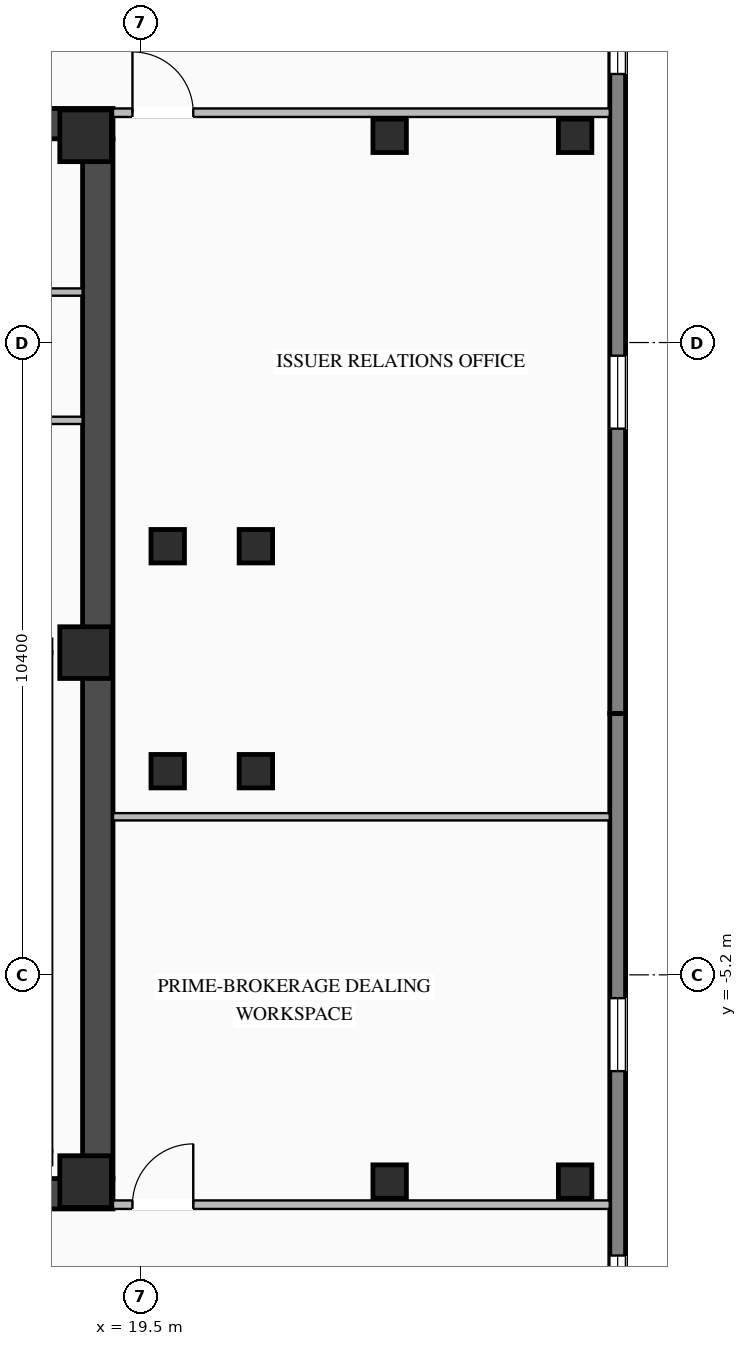
"""IFC4 building model, lengths in metres.
Left out: names, types, materials, properties, quantities, classifications, styles, units other than length and angle.
Written with IfcOpenShell. Run it as: python <this file> out.ifc"""

import sys

from ifc_helpers import new_model, si_unit, direction, frame, frame_2d, origin, origin_2d, place, context, subcontext, project, spatial, rectangle, i_section, extrude, element, fill, save


model = new_model("IFC4")
c1 = context("Model", 3, precision=1e-05, world=origin(), true_north=direction((0.0, 1.0)))
c2 = subcontext(c1, "Body", "Model", "MODEL_VIEW")
j1 = project(units=[si_unit("LENGTHUNIT", "METRE"), si_unit("PLANEANGLEUNIT", "RADIAN")], contexts=[c1])
p1 = place(None, origin())
s1 = spatial("IfcSite", under=j1, at=p1, CompositionType="ELEMENT")
p2 = place(p1, origin())
s2 = spatial("IfcBuilding", under=s1, at=p2, CompositionType="ELEMENT")
p3 = place(p2, frame((0.0, 0.0, 236.1)))
s3 = spatial("IfcBuildingStorey", under=s2, at=p3, CompositionType="ELEMENT", Elevation=236.1)
p4 = place(p3, frame((8.8, -8.8, 0.0), z_axis=(0.0, 0.0, 1.0), x_axis=(1.0, 0.0, 0.0)))
e1 = element("IfcWall", 1, at=p4, inside=s3, PredefinedType="SHEAR", context=c2, shape_type="SweptSolid", body=[
    extrude(rectangle(XDim=10.25, YDim=0.5, at=frame_2d((5.125, 0.0))), origin(), (0.0, 0.0, 1.0), 3.27),
])
p5 = place(p3, frame((8.8, 8.8, 0.0), z_axis=(0.0, 0.0, 1.0), x_axis=(1.0, 0.0, 0.0)))
e2 = element("IfcWall", 2, at=p5, inside=s3, PredefinedType="SHEAR", context=c2, shape_type="SweptSolid", body=[
    extrude(rectangle(XDim=10.25, YDim=0.5, at=frame_2d((5.125, 0.0))), origin(), (0.0, 0.0, 1.0), 3.27),
])
p6 = place(p5, frame((3.25, 0.0, 0.0)))
e3 = element("IfcOpeningElement", 3, at=p6, cuts=e2, PredefinedType="OPENING", context=c2, shape_type="SweptSolid", body=[
    extrude(rectangle(XDim=1.4, YDim=2.05, at=frame_2d((0.7, 1.025))), frame((0.0, 0.26, 0.0), z_axis=(0.0, -1.0, 0.0), x_axis=(1.0, 0.0, 0.0)), (0.0, 0.0, 1.0), 0.52),
])
p7 = place(p3, frame((18.8, -8.55, 0.0), z_axis=(0.0, 0.0, 1.0), x_axis=(0.0, 1.0, 0.0)))
e4 = element("IfcWall", 4, at=p7, inside=s3, PredefinedType="SHEAR", context=c2, shape_type="SweptSolid", body=[
    extrude(rectangle(XDim=17.1, YDim=0.5, at=frame_2d((8.55, 0.0))), origin(), (0.0, 0.0, 1.0), 3.27),
])
for number, where, z_axis, x_axis in (
    (5, (18.6, -8.6, 0.0), (0.0, 0.0, 1.0), (1.0, 0.0, 0.0)),
    (6, (18.6, 0.1, 0.0), (0.0, 0.0, 1.0), (1.0, 0.0, 0.0)),
    (7, (18.6, 8.6, 0.0), (0.0, 0.0, 1.0), (1.0, 0.0, 0.0)),
):
    element("IfcColumn", number, at=place(p3, frame(where, z_axis=z_axis, x_axis=x_axis)), inside=s3, PredefinedType="COLUMN", context=c2, shape_type="SweptSolid", body=[
        extrude(rectangle(XDim=0.85, YDim=0.85, at=origin_2d()), origin(), (0.0, 0.0, 1.0), 3.45),
    ])
for number, where, z_axis, x_axis in (
    (8, (19.95, -1.85, 0.0), (0.0, 0.0, 1.0), (1.0, 0.0, 0.0)),
    (9, (19.95, 1.85, 0.0), (0.0, 0.0, 1.0), (1.0, 0.0, 0.0)),
    (10, (21.4, -1.85, 0.0), (0.0, 0.0, 1.0), (1.0, 0.0, 0.0)),
    (11, (21.4, 1.85, 0.0), (0.0, 0.0, 1.0), (1.0, 0.0, 0.0)),
    (12, (23.6, -8.6, 0.0), (0.0, 0.0, 1.0), (1.0, 0.0, 0.0)),
    (13, (23.6, 8.6, 0.0), (0.0, 0.0, 1.0), (1.0, 0.0, 0.0)),
    (14, (26.65, -8.6, 0.0), (0.0, 0.0, 1.0), (1.0, 0.0, 0.0)),
    (15, (26.65, 8.6, 0.0), (0.0, 0.0, 1.0), (1.0, 0.0, 0.0)),
):
    element("IfcColumn", number, at=place(p3, frame(where, z_axis=z_axis, x_axis=x_axis)), inside=s3, PredefinedType="COLUMN", context=c2, shape_type="SweptSolid", body=[
        extrude(i_section(OverallWidth=0.55, OverallDepth=0.55, WebThickness=0.024, FlangeThickness=0.036, at=origin_2d()), origin(), (0.0, 0.0, 1.0), 3.45),
    ])
p8 = place(p3, frame((27.35, -0.9, 0.0), z_axis=(0.0, 0.0, 1.0), x_axis=(0.0, -1.0, 0.0)))
e16 = element("IfcWall", 16, at=p8, inside=s3, PredefinedType="STANDARD", context=c2, shape_type="SweptSolid", body=[
    extrude(rectangle(XDim=15.85, YDim=0.26, at=frame_2d((7.925, 0.0))), origin(), (0.0, 0.0, 1.0), 3.25),
])
p9 = place(p8, frame((4.683, 0.0, 0.76)))
e17 = element("IfcOpeningElement", 17, at=p9, cuts=e16, PredefinedType="OPENING", context=c2, shape_type="SweptSolid", body=[
    extrude(rectangle(XDim=1.2, YDim=1.95, at=frame_2d((0.6, 0.975))), frame((0.0, 0.14, 0.0), z_axis=(0.0, -1.0, 0.0), x_axis=(1.0, 0.0, 0.0)), (0.0, 0.0, 1.0), 0.28),
])
p10 = place(p8, frame((8.917, 0.0, 0.76)))
e18 = element("IfcOpeningElement", 18, at=p10, cuts=e16, PredefinedType="OPENING", context=c2, shape_type="SweptSolid", body=[
    extrude(rectangle(XDim=1.2, YDim=1.95, at=frame_2d((0.6, 0.975))), frame((0.0, 0.14, 0.0), z_axis=(0.0, -1.0, 0.0), x_axis=(1.0, 0.0, 0.0)), (0.0, 0.0, 1.0), 0.28),
])
p11 = place(p3, frame((27.35, 14.95, 0.0), z_axis=(0.0, 0.0, 1.0), x_axis=(0.0, -1.0, 0.0)))
e19 = element("IfcWall", 19, at=p11, inside=s3, PredefinedType="STANDARD", context=c2, shape_type="SweptSolid", body=[
    extrude(rectangle(XDim=15.85, YDim=0.26, at=frame_2d((7.925, 0.0))), origin(), (0.0, 0.0, 1.0), 3.25),
])
p12 = place(p11, frame((4.133, 0.0, 0.76)))
e20 = element("IfcOpeningElement", 20, at=p12, cuts=e19, PredefinedType="OPENING", context=c2, shape_type="SweptSolid", body=[
    extrude(rectangle(XDim=1.2, YDim=1.95, at=frame_2d((0.6, 0.975))), frame((0.0, 0.14, 0.0), z_axis=(0.0, -1.0, 0.0), x_axis=(1.0, 0.0, 0.0)), (0.0, 0.0, 1.0), 0.28),
])
p13 = place(p11, frame((9.967, 0.0, 0.76)))
e21 = element("IfcOpeningElement", 21, at=p13, cuts=e19, PredefinedType="OPENING", context=c2, shape_type="SweptSolid", body=[
    extrude(rectangle(XDim=1.2, YDim=1.95, at=frame_2d((0.6, 0.975))), frame((0.0, 0.14, 0.0), z_axis=(0.0, -1.0, 0.0), x_axis=(1.0, 0.0, 0.0)), (0.0, 0.0, 1.0), 0.28),
])
p14 = place(p3, frame((13.9, 3.92, 0.0), z_axis=(0.0, 0.0, 1.0), x_axis=(1.0, 0.0, 0.0)))
e22 = element("IfcWall", 22, at=p14, inside=s3, PredefinedType="STANDARD", context=c2, shape_type="SweptSolid", body=[
    extrude(rectangle(XDim=4.65, YDim=0.12, at=frame_2d((2.325, 0.0))), origin(), (0.0, 0.0, 1.0), 3.25),
])
p15 = place(p3, frame((16.15, 6.03, 0.0), z_axis=(0.0, 0.0, 1.0), x_axis=(1.0, 0.0, 0.0)))
e23 = element("IfcWall", 23, at=p15, inside=s3, PredefinedType="STANDARD", context=c2, shape_type="SweptSolid", body=[
    extrude(rectangle(XDim=2.4, YDim=0.12, at=frame_2d((1.2, 0.0))), origin(), (0.0, 0.0, 1.0), 3.25),
])
p16 = place(p3, frame((19.05, 8.98, 0.0), z_axis=(0.0, 0.0, 1.0), x_axis=(1.0, 0.0, 0.0)))
e24 = element("IfcWall", 24, at=p16, inside=s3, PredefinedType="STANDARD", context=c2, shape_type="SweptSolid", body=[
    extrude(rectangle(XDim=8.17, YDim=0.14, at=frame_2d((4.085, 0.0))), origin(), (0.0, 0.0, 1.0), 3.25),
])
p17 = place(p16, frame((0.32, 0.0, 0.0)))
e25 = element("IfcOpeningElement", 25, at=p17, cuts=e24, PredefinedType="OPENING", context=c2, shape_type="SweptSolid", body=[
    extrude(rectangle(XDim=1.0, YDim=2.08, at=frame_2d((0.5, 1.04))), frame((0.0, 0.08, 0.0), z_axis=(0.0, -1.0, 0.0), x_axis=(1.0, 0.0, 0.0)), (0.0, 0.0, 1.0), 0.16),
])
p18 = place(p3, frame((19.05, -8.98, 0.0), z_axis=(0.0, 0.0, 1.0), x_axis=(1.0, 0.0, 0.0)))
e26 = element("IfcWall", 26, at=p18, inside=s3, PredefinedType="STANDARD", context=c2, shape_type="SweptSolid", body=[
    extrude(rectangle(XDim=8.17, YDim=0.14, at=frame_2d((4.085, 0.0))), origin(), (0.0, 0.0, 1.0), 3.25),
])
p19 = place(p18, frame((0.32, 0.0, 0.0)))
e27 = element("IfcOpeningElement", 27, at=p19, cuts=e26, PredefinedType="OPENING", context=c2, shape_type="SweptSolid", body=[
    extrude(rectangle(XDim=1.0, YDim=2.08, at=frame_2d((0.5, 1.04))), frame((0.0, 0.08, 0.0), z_axis=(0.0, -1.0, 0.0), x_axis=(1.0, 0.0, 0.0)), (0.0, 0.0, 1.0), 0.16),
])
p20 = place(p3, frame((19.05, -2.6, 0.0), z_axis=(0.0, 0.0, 1.0), x_axis=(1.0, 0.0, 0.0)))
e28 = element("IfcWall", 28, at=p20, inside=s3, PredefinedType="STANDARD", context=c2, shape_type="SweptSolid", body=[
    extrude(rectangle(XDim=8.17, YDim=0.12, at=frame_2d((4.085, 0.0))), origin(), (0.0, 0.0, 1.0), 3.25),
])
p21 = place(p9, origin())
e29 = element("IfcWindow", 29, at=p21, inside=s3, PartitioningType="SINGLE_PANEL", PredefinedType="WINDOW", context=c2, shape_type="SweptSolid", body=[
    extrude(rectangle(XDim=1.2, YDim=1.95, at=frame_2d((0.6, 0.975))), frame((0.0, 0.03, 0.0), z_axis=(0.0, -1.0, 0.0), x_axis=(1.0, 0.0, 0.0)), (0.0, 0.0, 1.0), 0.06),
])
fill(e17, e29)
p22 = place(p10, origin())
e30 = element("IfcWindow", 30, at=p22, inside=s3, PartitioningType="SINGLE_PANEL", PredefinedType="WINDOW", context=c2, shape_type="SweptSolid", body=[
    extrude(rectangle(XDim=1.2, YDim=1.95, at=frame_2d((0.6, 0.975))), frame((0.0, 0.03, 0.0), z_axis=(0.0, -1.0, 0.0), x_axis=(1.0, 0.0, 0.0)), (0.0, 0.0, 1.0), 0.06),
])
fill(e18, e30)
p23 = place(p12, origin())
e31 = element("IfcWindow", 31, at=p23, inside=s3, PartitioningType="SINGLE_PANEL", PredefinedType="WINDOW", context=c2, shape_type="SweptSolid", body=[
    extrude(rectangle(XDim=1.2, YDim=1.95, at=frame_2d((0.6, 0.975))), frame((0.0, 0.03, 0.0), z_axis=(0.0, -1.0, 0.0), x_axis=(1.0, 0.0, 0.0)), (0.0, 0.0, 1.0), 0.06),
])
fill(e20, e31)
p24 = place(p13, origin())
e32 = element("IfcWindow", 32, at=p24, inside=s3, PartitioningType="SINGLE_PANEL", PredefinedType="WINDOW", context=c2, shape_type="SweptSolid", body=[
    extrude(rectangle(XDim=1.2, YDim=1.95, at=frame_2d((0.6, 0.975))), frame((0.0, 0.03, 0.0), z_axis=(0.0, -1.0, 0.0), x_axis=(1.0, 0.0, 0.0)), (0.0, 0.0, 1.0), 0.06),
])
fill(e21, e32)
p25 = place(p17, origin())
e33 = element("IfcDoor", 33, at=p25, inside=s3, OperationType="SINGLE_SWING_LEFT", PredefinedType="DOOR", context=c2, shape_type="SweptSolid", body=[
    extrude(rectangle(XDim=1.0, YDim=2.08, at=frame_2d((0.5, 1.04))), frame((0.0, 0.025, 0.0), z_axis=(0.0, -1.0, 0.0), x_axis=(1.0, 0.0, 0.0)), (0.0, 0.0, 1.0), 0.05),
])
fill(e25, e33)
p26 = place(p19, origin())
e34 = element("IfcDoor", 34, at=p26, inside=s3, OperationType="SINGLE_SWING_RIGHT", PredefinedType="DOOR", context=c2, shape_type="SweptSolid", body=[
    extrude(rectangle(XDim=1.0, YDim=2.08, at=frame_2d((0.5, 1.04))), frame((0.0, 0.025, 0.0), z_axis=(0.0, -1.0, 0.0), x_axis=(1.0, 0.0, 0.0)), (0.0, 0.0, 1.0), 0.05),
])
fill(e27, e34)
save(model, sys.argv[1])
